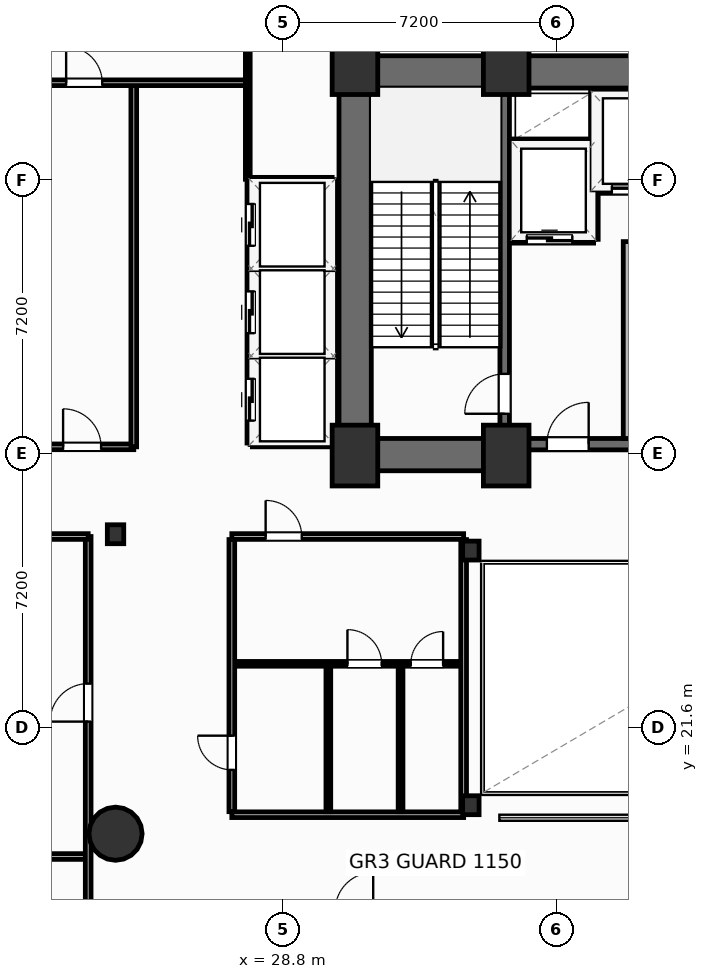
"""IFC4 building model, lengths in metres.
Left out: names, types, materials, properties, quantities, classifications, styles, units other than length and angle.
Written with IfcOpenShell. Run it as: python <this file> out.ifc"""

import sys

from ifc_helpers import new_model, si_unit, direction, frame, frame_2d, origin, origin_2d, place, context, subcontext, project, spatial, rectangle, circle, i_section, extrude, element, fill, save


model = new_model("IFC4")
c1 = context("Model", 3, precision=1e-05, world=origin(), true_north=direction((0.0, 1.0)))
c2 = subcontext(c1, "Body", "Model", "MODEL_VIEW")
j1 = project(units=[si_unit("LENGTHUNIT", "METRE"), si_unit("PLANEANGLEUNIT", "RADIAN")], contexts=[c1])
p1 = place(None, origin())
s1 = spatial("IfcSite", under=j1, at=p1, CompositionType="ELEMENT")
p2 = place(p1, origin())
s2 = spatial("IfcBuilding", under=s1, at=p2, CompositionType="ELEMENT")
p3 = place(p2, frame((0.0, 0.0, 21.6)))
s3 = spatial("IfcBuildingStorey", under=s2, at=p3, CompositionType="ELEMENT", Elevation=21.6)
for number, where, z_axis, x_axis in (
    (1, (30.7, 28.75, 0.0), (0.0, 0.0, 1.0), (1.0, 0.0, 0.0)),
    (2, (34.68, 28.75, 0.0), (0.0, 0.0, 1.0), (1.0, 0.0, 0.0)),
    (3, (30.7, 39.05, 0.0), (0.0, 0.0, 1.0), (1.0, 0.0, 0.0)),
    (4, (34.68, 39.05, 0.0), (0.0, 0.0, 1.0), (1.0, 0.0, 0.0)),
):
    element("IfcColumn", number, at=place(p3, frame(where, z_axis=z_axis, x_axis=x_axis)), inside=s3, PredefinedType="COLUMN", context=c2, shape_type="SweptSolid", body=[
        extrude(rectangle(XDim=1.2, YDim=1.6, at=origin_2d()), origin(), (0.0, 0.0, 1.0), 5.4),
    ])
for number, where, z_axis, x_axis in (
    (5, (33.75, 19.55, 0.0), (0.0, 0.0, 1.0), (1.0, 0.0, 0.0)),
    (6, (33.75, 26.25, 0.0), (0.0, 0.0, 1.0), (1.0, 0.0, 0.0)),
    (7, (24.4, 26.68, 0.0), (0.0, 0.0, 1.0), (1.0, 0.0, 0.0)),
):
    element("IfcColumn", number, at=place(p3, frame(where, z_axis=z_axis, x_axis=x_axis)), inside=s3, PredefinedType="COLUMN", context=c2, shape_type="SweptSolid", body=[
        extrude(i_section(OverallWidth=0.432, OverallDepth=0.498, WebThickness=0.056, FlangeThickness=0.089, FilletRadius=0.025, at=origin_2d()), origin(), (0.0, 0.0, 1.0), 5.4),
    ])
p4 = place(p3, frame((30.28, 38.845, 0.0), z_axis=(0.0, 0.0, 1.0), x_axis=(1.0, 0.0, 0.0)))
e8 = element("IfcWall", 8, at=p4, inside=s3, PredefinedType="SHEAR", context=c2, shape_type="SweptSolid", body=[
    extrude(rectangle(XDim=17.84, YDim=0.85, at=frame_2d((8.92, 0.0))), origin(), (0.0, 0.0, 1.0), 5.15),
])
p5 = place(p3, frame((30.705, 29.2, 0.0), z_axis=(0.0, 0.0, 1.0), x_axis=(0.0, 1.0, 0.0)))
e9 = element("IfcWall", 9, at=p5, inside=s3, PredefinedType="SHEAR", context=c2, shape_type="SweptSolid", body=[
    extrude(rectangle(XDim=9.22, YDim=0.85, at=frame_2d((4.61, 0.0))), origin(), (0.0, 0.0, 1.0), 5.15),
])
p6 = place(p3, frame((30.28, 28.775, 0.0), z_axis=(0.0, 0.0, 1.0), x_axis=(1.0, 0.0, 0.0)))
e10 = element("IfcWall", 10, at=p6, inside=s3, PredefinedType="SHEAR", context=c2, shape_type="SweptSolid", body=[
    extrude(rectangle(XDim=4.52, YDim=0.85, at=frame_2d((2.26, 0.0))), origin(), (0.0, 0.0, 1.0), 5.15),
])
p7 = place(p3, frame((34.8, 29.05, 0.0), z_axis=(0.0, 0.0, 1.0), x_axis=(1.0, 0.0, 0.0)))
e11 = element("IfcWall", 11, at=p7, inside=s3, PredefinedType="SHEAR", context=c2, shape_type="SweptSolid", body=[
    extrude(rectangle(XDim=8.8, YDim=0.3, at=frame_2d((4.4, 0.0))), origin(), (0.0, 0.0, 1.0), 5.15),
])
p8 = place(p7, frame((0.95, 0.0, 0.0)))
e12 = element("IfcOpeningElement", 12, at=p8, cuts=e11, PredefinedType="OPENING", context=c2, shape_type="SweptSolid", body=[
    extrude(rectangle(XDim=1.1, YDim=2.15, at=frame_2d((0.55, 1.075))), frame((0.0, 0.16, 0.0), z_axis=(0.0, -1.0, 0.0), x_axis=(1.0, 0.0, 0.0)), (0.0, 0.0, 1.0), 0.32),
])
p9 = place(p7, frame((6.75, 0.0, 0.0)))
e13 = element("IfcOpeningElement", 13, at=p9, cuts=e11, PredefinedType="OPENING", context=c2, shape_type="SweptSolid", body=[
    extrude(rectangle(XDim=1.1, YDim=2.15, at=frame_2d((0.55, 1.075))), frame((0.0, 0.16, 0.0), z_axis=(0.0, -1.0, 0.0), x_axis=(1.0, 0.0, 0.0)), (0.0, 0.0, 1.0), 0.32),
])
p10 = place(p7, frame((4.45, 0.0, 0.0)))
e14 = element("IfcOpeningElement", 14, at=p10, cuts=e11, PredefinedType="OPENING", context=c2, shape_type="SweptSolid", body=[
    extrude(rectangle(XDim=0.95, YDim=2.15, at=frame_2d((0.475, 1.075))), frame((0.0, 0.16, 0.0), z_axis=(0.0, -1.0, 0.0), x_axis=(1.0, 0.0, 0.0)), (0.0, 0.0, 1.0), 0.32),
])
p11 = place(p3, frame((34.64, 29.2, 0.0), z_axis=(0.0, 0.0, 1.0), x_axis=(0.0, 1.0, 0.0)))
e15 = element("IfcWall", 15, at=p11, inside=s3, PredefinedType="SHEAR", context=c2, shape_type="SweptSolid", body=[
    extrude(rectangle(XDim=9.22, YDim=0.25, at=frame_2d((4.61, 0.0))), origin(), (0.0, 0.0, 1.0), 5.15),
])
p12 = place(p11, frame((0.65, 0.0, 0.0)))
e16 = element("IfcOpeningElement", 16, at=p12, cuts=e15, PredefinedType="OPENING", context=c2, shape_type="SweptSolid", body=[
    extrude(rectangle(XDim=1.05, YDim=2.15, at=frame_2d((0.525, 1.075))), frame((0.0, 0.135, 0.0), z_axis=(0.0, -1.0, 0.0), x_axis=(1.0, 0.0, 0.0)), (0.0, 0.0, 1.0), 0.27),
])
p13 = place(p3, frame((24.4, 18.8, 0.0), z_axis=(0.0, 0.0, 1.0), x_axis=(1.0, 0.0, 0.0)))
e17 = element("IfcColumn", 17, at=p13, inside=s3, PredefinedType="COLUMN", context=c2, shape_type="SweptSolid", body=[
    extrude(circle(Radius=0.7, at=origin_2d()), origin(), (0.0, 0.0, 1.0), 5.4),
])
p14 = place(p3, frame((22.22, 28.98, 0.0), z_axis=(0.0, 0.0, 1.0), x_axis=(1.0, 0.0, 0.0)))
e18 = element("IfcWall", 18, at=p14, inside=s3, PredefinedType="PARTITIONING", context=c2, shape_type="SweptSolid", body=[
    extrude(rectangle(XDim=2.66, YDim=0.15, at=frame_2d((1.33, 0.0))), origin(), (0.0, 0.0, 1.0), 5.15),
])
p15 = place(p14, frame((0.8, 0.0, 0.0)))
e19 = element("IfcOpeningElement", 19, at=p15, cuts=e18, PredefinedType="OPENING", context=c2, shape_type="SweptSolid", body=[
    extrude(rectangle(XDim=1.0, YDim=2.05, at=frame_2d((0.5, 1.025))), frame((0.0, 0.085, 0.0), z_axis=(0.0, -1.0, 0.0), x_axis=(1.0, 0.0, 0.0)), (0.0, 0.0, 1.0), 0.17),
])
p16 = place(p3, frame((24.88, 28.98, 0.0), z_axis=(0.0, 0.0, 1.0), x_axis=(0.0, 1.0, 0.0)))
e20 = element("IfcWall", 20, at=p16, inside=s3, PredefinedType="PARTITIONING", context=c2, shape_type="SweptSolid", body=[
    extrude(rectangle(XDim=9.58, YDim=0.15, at=frame_2d((4.79, 0.0))), origin(), (0.0, 0.0, 1.0), 5.15),
])
p17 = place(p3, frame((18.6, 38.56, 0.0), z_axis=(0.0, 0.0, 1.0), x_axis=(1.0, 0.0, 0.0)))
e21 = element("IfcWall", 21, at=p17, inside=s3, PredefinedType="PARTITIONING", context=c2, shape_type="SweptSolid", body=[
    extrude(rectangle(XDim=9.28, YDim=0.15, at=frame_2d((4.64, 0.0))), origin(), (0.0, 0.0, 1.0), 5.15),
])
p18 = place(p17, frame((4.5, 0.0, 0.0)))
e22 = element("IfcOpeningElement", 22, at=p18, cuts=e21, PredefinedType="OPENING", context=c2, shape_type="SweptSolid", body=[
    extrude(rectangle(XDim=0.95, YDim=2.05, at=frame_2d((0.475, 1.025))), frame((0.0, 0.085, 0.0), z_axis=(0.0, -1.0, 0.0), x_axis=(1.0, 0.0, 0.0)), (0.0, 0.0, 1.0), 0.17),
])
p19 = place(p3, frame((27.88, 36.02, 0.0), z_axis=(0.0, 0.0, 1.0), x_axis=(0.0, 1.0, 0.0)))
e23 = element("IfcWall", 23, at=p19, inside=s3, PredefinedType="PARTITIONING", context=c2, shape_type="SweptSolid", body=[
    extrude(rectangle(XDim=14.18, YDim=0.125, at=frame_2d((7.09, 0.0))), origin(), (0.0, 0.0, 1.0), 5.15),
])
p20 = place(p3, frame((0.2, 18.2, 0.0), z_axis=(0.0, 0.0, 1.0), x_axis=(1.0, 0.0, 0.0)))
e24 = element("IfcWall", 24, at=p20, inside=s3, PredefinedType="PARTITIONING", context=c2, shape_type="SweptSolid", body=[
    extrude(rectangle(XDim=23.48, YDim=0.15, at=frame_2d((11.74, 0.0))), origin(), (0.0, 0.0, 1.0), 1.935),
])
p21 = place(p3, frame((23.68, 0.25, 0.0), z_axis=(0.0, 0.0, 1.0), x_axis=(0.0, 1.0, 0.0)))
e25 = element("IfcWall", 25, at=p21, inside=s3, PredefinedType="PARTITIONING", context=c2, shape_type="SweptSolid", body=[
    extrude(rectangle(XDim=26.37, YDim=0.15, at=frame_2d((13.185, 0.0))), origin(), (0.0, 0.0, 1.0), 5.15),
])
p22 = place(p21, frame((21.5, 0.0, 0.0)))
e26 = element("IfcOpeningElement", 26, at=p22, cuts=e25, PredefinedType="OPENING", context=c2, shape_type="SweptSolid", body=[
    extrude(rectangle(XDim=1.0, YDim=2.05, at=frame_2d((0.5, 1.025))), frame((0.0, 0.085, 0.0), z_axis=(0.0, -1.0, 0.0), x_axis=(1.0, 0.0, 0.0)), (0.0, 0.0, 1.0), 0.17),
])
p23 = place(p21, frame((13.2, 0.0, 0.0)))
e27 = element("IfcOpeningElement", 27, at=p23, cuts=e25, PredefinedType="OPENING", context=c2, shape_type="SweptSolid", body=[
    extrude(rectangle(XDim=1.0, YDim=2.05, at=frame_2d((0.5, 1.025))), frame((0.0, 0.085, 0.0), z_axis=(0.0, -1.0, 0.0), x_axis=(1.0, 0.0, 0.0)), (0.0, 0.0, 1.0), 0.17),
])
p24 = place(p3, frame((0.2, 26.62, 0.0), z_axis=(0.0, 0.0, 1.0), x_axis=(1.0, 0.0, 0.0)))
e28 = element("IfcWall", 28, at=p24, inside=s3, PredefinedType="PARTITIONING", context=c2, shape_type="SweptSolid", body=[
    extrude(rectangle(XDim=23.48, YDim=0.15, at=frame_2d((11.74, 0.0))), origin(), (0.0, 0.0, 1.0), 5.15),
])
p25 = place(p3, frame((37.86, 29.2, 0.0), z_axis=(0.0, 0.0, 1.0), x_axis=(0.0, 1.0, 0.0)))
e29 = element("IfcWall", 29, at=p25, inside=s3, PredefinedType="PARTITIONING", context=c2, shape_type="SweptSolid", body=[
    extrude(rectangle(XDim=5.18, YDim=0.2, at=frame_2d((2.59, 0.0))), origin(), (0.0, 0.0, 1.0), 5.15),
])
p26 = place(p3, frame((34.8, 34.44, 0.0), z_axis=(0.0, 0.0, 1.0), x_axis=(1.0, 0.0, 0.0)))
e30 = element("IfcWall", 30, at=p26, inside=s3, PredefinedType="PARTITIONING", context=c2, shape_type="SweptSolid", body=[
    extrude(rectangle(XDim=2.18, YDim=0.2, at=frame_2d((1.09, 0.0))), origin(), (0.0, 0.0, 1.0), 5.15),
])
p27 = place(p26, frame((0.42, 0.0, 0.0)))
e31 = element("IfcOpeningElement", 31, at=p27, cuts=e30, PredefinedType="OPENING", context=c2, shape_type="SweptSolid", body=[
    extrude(rectangle(XDim=1.2, YDim=2.2, at=frame_2d((0.6, 1.1))), frame((0.0, 0.11, 0.0), z_axis=(0.0, -1.0, 0.0), x_axis=(1.0, 0.0, 0.0)), (0.0, 0.0, 1.0), 0.22),
])
p28 = place(p3, frame((34.8, 36.98, 0.0), z_axis=(0.0, 0.0, 1.0), x_axis=(1.0, 0.0, 0.0)))
e32 = element("IfcWall", 32, at=p28, inside=s3, PredefinedType="PARTITIONING", context=c2, shape_type="SweptSolid", body=[
    extrude(rectangle(XDim=2.18, YDim=0.2, at=frame_2d((1.09, 0.0))), origin(), (0.0, 0.0, 1.0), 5.15),
])
p29 = place(p3, frame((37.0, 34.44, 0.0), z_axis=(0.0, 0.0, 1.0), x_axis=(0.0, 1.0, 0.0)))
e33 = element("IfcWall", 33, at=p29, inside=s3, PredefinedType="PARTITIONING", context=c2, shape_type="SweptSolid", body=[
    extrude(rectangle(XDim=3.9, YDim=0.2, at=frame_2d((1.95, 0.0))), origin(), (0.0, 0.0, 1.0), 5.15),
])
p30 = place(p3, frame((37.06, 35.75, 0.0), z_axis=(0.0, 0.0, 1.0), x_axis=(1.0, 0.0, 0.0)))
e34 = element("IfcWall", 34, at=p30, inside=s3, PredefinedType="PARTITIONING", context=c2, shape_type="SweptSolid", body=[
    extrude(rectangle(XDim=2.12, YDim=0.2, at=frame_2d((1.06, 0.0))), origin(), (0.0, 0.0, 1.0), 5.15),
])
p31 = place(p30, frame((0.4, 0.0, 0.0)))
e35 = element("IfcOpeningElement", 35, at=p31, cuts=e34, PredefinedType="OPENING", context=c2, shape_type="SweptSolid", body=[
    extrude(rectangle(XDim=1.3, YDim=2.2, at=frame_2d((0.65, 1.1))), frame((0.0, 0.11, 0.0), z_axis=(0.0, -1.0, 0.0), x_axis=(1.0, 0.0, 0.0)), (0.0, 0.0, 1.0), 0.22),
])
p32 = place(p3, frame((27.46, 26.62, 0.0), z_axis=(0.0, 0.0, 1.0), x_axis=(1.0, 0.0, 0.0)))
e36 = element("IfcWall", 36, at=p32, inside=s3, PredefinedType="PARTITIONING", context=c2, shape_type="SweptSolid", body=[
    extrude(rectangle(XDim=6.1, YDim=0.15, at=frame_2d((3.05, 0.0))), origin(), (0.0, 0.0, 1.0), 4.362),
])
p33 = place(p32, frame((0.89, 0.0, 0.0)))
e37 = element("IfcOpeningElement", 37, at=p33, cuts=e36, PredefinedType="OPENING", context=c2, shape_type="SweptSolid", body=[
    extrude(rectangle(XDim=0.95, YDim=2.05, at=frame_2d((0.475, 1.025))), frame((0.0, 0.085, 0.0), z_axis=(0.0, -1.0, 0.0), x_axis=(1.0, 0.0, 0.0)), (0.0, 0.0, 1.0), 0.17),
])
p34 = place(p3, frame((27.46, 19.3, 0.0), z_axis=(0.0, 0.0, 1.0), x_axis=(1.0, 0.0, 0.0)))
e38 = element("IfcWall", 38, at=p34, inside=s3, PredefinedType="PARTITIONING", context=c2, shape_type="SweptSolid", body=[
    extrude(rectangle(XDim=6.1, YDim=0.15, at=frame_2d((3.05, 0.0))), origin(), (0.0, 0.0, 1.0), 4.362),
])
p35 = place(p3, frame((27.52, 23.27, 0.0), z_axis=(0.0, 0.0, 1.0), x_axis=(1.0, 0.0, 0.0)))
e39 = element("IfcWall", 39, at=p35, inside=s3, PredefinedType="PARTITIONING", context=c2, shape_type="SweptSolid", body=[
    extrude(rectangle(XDim=6.0, YDim=0.125, at=frame_2d((3.0, 0.0))), origin(), (0.0, 0.0, 1.0), 5.15),
])
p36 = place(p35, frame((2.982, 0.0, 0.0)))
e40 = element("IfcOpeningElement", 40, at=p36, cuts=e39, PredefinedType="OPENING", context=c2, shape_type="SweptSolid", body=[
    extrude(rectangle(XDim=0.9, YDim=2.05, at=frame_2d((0.45, 1.025))), frame((0.0, 0.073, 0.0), z_axis=(0.0, -1.0, 0.0), x_axis=(1.0, 0.0, 0.0)), (0.0, 0.0, 1.0), 0.145),
])
p37 = place(p35, frame((4.65, 0.0, 0.0)))
e41 = element("IfcOpeningElement", 41, at=p37, cuts=e39, PredefinedType="OPENING", context=c2, shape_type="SweptSolid", body=[
    extrude(rectangle(XDim=0.85, YDim=2.05, at=frame_2d((0.425, 1.025))), frame((0.0, 0.073, 0.0), z_axis=(0.0, -1.0, 0.0), x_axis=(1.0, 0.0, 0.0)), (0.0, 0.0, 1.0), 0.145),
])
for number, where, z_axis, x_axis in (
    (42, (30.0, 19.38, 0.0), (0.0, 0.0, 1.0), (0.0, 1.0, 0.0)),
    (43, (31.9, 19.38, 0.0), (0.0, 0.0, 1.0), (0.0, 1.0, 0.0)),
):
    element("IfcWall", number, at=place(p3, frame(where, z_axis=z_axis, x_axis=x_axis)), inside=s3, PredefinedType="PARTITIONING", context=c2, shape_type="SweptSolid", body=[
        extrude(rectangle(XDim=3.82, YDim=0.125, at=frame_2d((1.91, 0.0))), origin(), (0.0, 0.0, 1.0), 5.15),
    ])
p38 = place(p3, frame((27.46, 19.38, 0.0), z_axis=(0.0, 0.0, 1.0), x_axis=(0.0, 1.0, 0.0)))
e44 = element("IfcWall", 44, at=p38, inside=s3, PredefinedType="PARTITIONING", context=c2, shape_type="SweptSolid", body=[
    extrude(rectangle(XDim=7.16, YDim=0.15, at=frame_2d((3.58, 0.0))), origin(), (0.0, 0.0, 1.0), 5.15),
])
p39 = place(p38, frame((1.1, 0.0, 0.0)))
e45 = element("IfcOpeningElement", 45, at=p39, cuts=e44, PredefinedType="OPENING", context=c2, shape_type="SweptSolid", body=[
    extrude(rectangle(XDim=0.9, YDim=2.05, at=frame_2d((0.45, 1.025))), frame((0.0, 0.085, 0.0), z_axis=(0.0, -1.0, 0.0), x_axis=(1.0, 0.0, 0.0)), (0.0, 0.0, 1.0), 0.17),
])
p40 = place(p3, frame((33.56, 19.38, 0.0), z_axis=(0.0, 0.0, 1.0), x_axis=(0.0, 1.0, 0.0)))
e46 = element("IfcWall", 46, at=p40, inside=s3, PredefinedType="PARTITIONING", context=c2, shape_type="SweptSolid", body=[
    extrude(rectangle(XDim=7.16, YDim=0.15, at=frame_2d((3.58, 0.0))), origin(), (0.0, 0.0, 1.0), 4.524),
])
for number, where, z_axis, x_axis in (
    (47, (28.02, 31.375, 0.0), (0.0, 0.0, 1.0), (1.0, 0.0, 0.0)),
    (48, (28.02, 33.675, 0.0), (0.0, 0.0, 1.0), (1.0, 0.0, 0.0)),
):
    element("IfcWall", number, at=place(p3, frame(where, z_axis=z_axis, x_axis=x_axis)), inside=s3, PredefinedType="PARTITIONING", context=c2, shape_type="SweptSolid", body=[
        extrude(rectangle(XDim=2.06, YDim=0.2, at=frame_2d((1.03, 0.0))), origin(), (0.0, 0.0, 1.0), 5.15),
    ])
for number, where, z_axis, x_axis in (
    (49, (28.0, 29.08, 0.0), (0.0, 0.0, 1.0), (1.0, 0.0, 0.0)),
    (50, (28.0, 35.97, 0.0), (0.0, 0.0, 1.0), (1.0, 0.0, 0.0)),
):
    element("IfcWall", number, at=place(p3, frame(where, z_axis=z_axis, x_axis=x_axis)), inside=s3, PredefinedType="PARTITIONING", context=c2, shape_type="SweptSolid", body=[
        extrude(rectangle(XDim=2.1, YDim=0.2, at=frame_2d((1.05, 0.0))), origin(), (0.0, 0.0, 1.0), 5.15),
    ])
p41 = place(p3, frame((30.12, 29.08, 0.0), z_axis=(0.0, 0.0, 1.0), x_axis=(0.0, 1.0, 0.0)))
e51 = element("IfcWall", 51, at=p41, inside=s3, PredefinedType="PARTITIONING", context=c2, shape_type="SweptSolid", body=[
    extrude(rectangle(XDim=6.89, YDim=0.2, at=frame_2d((3.445, 0.0))), origin(), (0.0, 0.0, 1.0), 5.15),
])
p42 = place(p3, frame((27.96, 29.08, 0.0), z_axis=(0.0, 0.0, 1.0), x_axis=(0.0, 1.0, 0.0)))
e52 = element("IfcWall", 52, at=p42, inside=s3, PredefinedType="PARTITIONING", context=c2, shape_type="SweptSolid", body=[
    extrude(rectangle(XDim=6.89, YDim=0.2, at=frame_2d((3.445, 0.0))), origin(), (0.0, 0.0, 1.0), 5.15),
])
p43 = place(p42, frame((0.59, 0.0, 0.0)))
e53 = element("IfcOpeningElement", 53, at=p43, cuts=e52, PredefinedType="OPENING", context=c2, shape_type="SweptSolid", body=[
    extrude(rectangle(XDim=1.1, YDim=2.15, at=frame_2d((0.55, 1.075))), frame((0.0, 0.11, 0.0), z_axis=(0.0, -1.0, 0.0), x_axis=(1.0, 0.0, 0.0)), (0.0, 0.0, 1.0), 0.22),
])
p44 = place(p42, frame((2.89, 0.0, 0.0)))
e54 = element("IfcOpeningElement", 54, at=p44, cuts=e52, PredefinedType="OPENING", context=c2, shape_type="SweptSolid", body=[
    extrude(rectangle(XDim=1.1, YDim=2.15, at=frame_2d((0.55, 1.075))), frame((0.0, 0.11, 0.0), z_axis=(0.0, -1.0, 0.0), x_axis=(1.0, 0.0, 0.0)), (0.0, 0.0, 1.0), 0.22),
])
p45 = place(p42, frame((5.19, 0.0, 0.0)))
e55 = element("IfcOpeningElement", 55, at=p45, cuts=e52, PredefinedType="OPENING", context=c2, shape_type="SweptSolid", body=[
    extrude(rectangle(XDim=1.1, YDim=2.15, at=frame_2d((0.55, 1.075))), frame((0.0, 0.11, 0.0), z_axis=(0.0, -1.0, 0.0), x_axis=(1.0, 0.0, 0.0)), (0.0, 0.0, 1.0), 0.22),
])
p46 = place(p15, origin())
e56 = element("IfcDoor", 56, at=p46, inside=s3, OperationType="SINGLE_SWING_LEFT", PredefinedType="DOOR", context=c2, shape_type="SweptSolid", body=[
    extrude(rectangle(XDim=1.0, YDim=2.05, at=frame_2d((0.5, 1.025))), frame((0.0, 0.025, 0.0), z_axis=(0.0, -1.0, 0.0), x_axis=(1.0, 0.0, 0.0)), (0.0, 0.0, 1.0), 0.05),
])
fill(e19, e56)
p47 = place(p18, origin())
e57 = element("IfcDoor", 57, at=p47, inside=s3, OperationType="SINGLE_SWING_LEFT", PredefinedType="DOOR", context=c2, shape_type="SweptSolid", body=[
    extrude(rectangle(XDim=0.95, YDim=2.05, at=frame_2d((0.475, 1.025))), frame((0.0, 0.025, 0.0), z_axis=(0.0, -1.0, 0.0), x_axis=(1.0, 0.0, 0.0)), (0.0, 0.0, 1.0), 0.05),
])
fill(e22, e57)
p48 = place(p22, origin())
e58 = element("IfcDoor", 58, at=p48, inside=s3, OperationType="SINGLE_SWING_LEFT", PredefinedType="DOOR", context=c2, shape_type="SweptSolid", body=[
    extrude(rectangle(XDim=1.0, YDim=2.05, at=frame_2d((0.5, 1.025))), frame((0.0, 0.025, 0.0), z_axis=(0.0, -1.0, 0.0), x_axis=(1.0, 0.0, 0.0)), (0.0, 0.0, 1.0), 0.05),
])
fill(e26, e58)
p49 = place(p12, origin())
e59 = element("IfcDoor", 59, at=p49, inside=s3, OperationType="SINGLE_SWING_LEFT", PredefinedType="DOOR", context=c2, shape_type="SweptSolid", body=[
    extrude(rectangle(XDim=1.05, YDim=2.15, at=frame_2d((0.525, 1.075))), frame((0.0, 0.025, 0.0), z_axis=(0.0, -1.0, 0.0), x_axis=(1.0, 0.0, 0.0)), (0.0, 0.0, 1.0), 0.05),
])
fill(e16, e59)
p50 = place(p8, origin())
e60 = element("IfcDoor", 60, at=p50, inside=s3, OperationType="SINGLE_SWING_RIGHT", PredefinedType="DOOR", context=c2, shape_type="SweptSolid", body=[
    extrude(rectangle(XDim=1.1, YDim=2.15, at=frame_2d((0.55, 1.075))), frame((0.0, 0.025, 0.0), z_axis=(0.0, -1.0, 0.0), x_axis=(1.0, 0.0, 0.0)), (0.0, 0.0, 1.0), 0.05),
])
fill(e12, e60)
p51 = place(p27, origin())
e61 = element("IfcDoor", 61, at=p51, inside=s3, OperationType="SLIDING_TO_LEFT", PredefinedType="DOOR", context=c2, shape_type="SweptSolid", body=[
    extrude(rectangle(XDim=1.2, YDim=2.2, at=frame_2d((0.6, 1.1))), frame((0.0, 0.025, 0.0), z_axis=(0.0, -1.0, 0.0), x_axis=(1.0, 0.0, 0.0)), (0.0, 0.0, 1.0), 0.05),
])
fill(e31, e61)
p52 = place(p31, origin())
e62 = element("IfcDoor", 62, at=p52, inside=s3, OperationType="SLIDING_TO_LEFT", PredefinedType="DOOR", context=c2, shape_type="SweptSolid", body=[
    extrude(rectangle(XDim=1.3, YDim=2.2, at=frame_2d((0.65, 1.1))), frame((0.0, 0.025, 0.0), z_axis=(0.0, -1.0, 0.0), x_axis=(1.0, 0.0, 0.0)), (0.0, 0.0, 1.0), 0.05),
])
fill(e35, e62)
p53 = place(p33, origin())
e63 = element("IfcDoor", 63, at=p53, inside=s3, OperationType="SINGLE_SWING_LEFT", PredefinedType="DOOR", context=c2, shape_type="SweptSolid", body=[
    extrude(rectangle(XDim=0.95, YDim=2.05, at=frame_2d((0.475, 1.025))), frame((0.0, 0.025, 0.0), z_axis=(0.0, -1.0, 0.0), x_axis=(1.0, 0.0, 0.0)), (0.0, 0.0, 1.0), 0.05),
])
fill(e37, e63)
p54 = place(p36, origin())
e64 = element("IfcDoor", 64, at=p54, inside=s3, OperationType="SINGLE_SWING_LEFT", PredefinedType="DOOR", context=c2, shape_type="SweptSolid", body=[
    extrude(rectangle(XDim=0.9, YDim=2.05, at=frame_2d((0.45, 1.025))), frame((0.0, 0.025, 0.0), z_axis=(0.0, -1.0, 0.0), x_axis=(1.0, 0.0, 0.0)), (0.0, 0.0, 1.0), 0.05),
])
fill(e40, e64)
p55 = place(p37, origin())
e65 = element("IfcDoor", 65, at=p55, inside=s3, OperationType="SINGLE_SWING_RIGHT", PredefinedType="DOOR", context=c2, shape_type="SweptSolid", body=[
    extrude(rectangle(XDim=0.85, YDim=2.05, at=frame_2d((0.425, 1.025))), frame((0.0, 0.025, 0.0), z_axis=(0.0, -1.0, 0.0), x_axis=(1.0, 0.0, 0.0)), (0.0, 0.0, 1.0), 0.05),
])
fill(e41, e65)
p56 = place(p39, origin())
e66 = element("IfcDoor", 66, at=p56, inside=s3, OperationType="SINGLE_SWING_RIGHT", PredefinedType="DOOR", context=c2, shape_type="SweptSolid", body=[
    extrude(rectangle(XDim=0.9, YDim=2.05, at=frame_2d((0.45, 1.025))), frame((0.0, 0.025, 0.0), z_axis=(0.0, -1.0, 0.0), x_axis=(1.0, 0.0, 0.0)), (0.0, 0.0, 1.0), 0.05),
])
fill(e45, e66)
p57 = place(p43, origin())
e67 = element("IfcDoor", 67, at=p57, inside=s3, OperationType="SLIDING_TO_LEFT", PredefinedType="DOOR", context=c2, shape_type="SweptSolid", body=[
    extrude(rectangle(XDim=1.1, YDim=2.15, at=frame_2d((0.55, 1.075))), frame((0.0, 0.025, 0.0), z_axis=(0.0, -1.0, 0.0), x_axis=(1.0, 0.0, 0.0)), (0.0, 0.0, 1.0), 0.05),
])
fill(e53, e67)
p58 = place(p44, origin())
e68 = element("IfcDoor", 68, at=p58, inside=s3, OperationType="SLIDING_TO_LEFT", PredefinedType="DOOR", context=c2, shape_type="SweptSolid", body=[
    extrude(rectangle(XDim=1.1, YDim=2.15, at=frame_2d((0.55, 1.075))), frame((0.0, 0.025, 0.0), z_axis=(0.0, -1.0, 0.0), x_axis=(1.0, 0.0, 0.0)), (0.0, 0.0, 1.0), 0.05),
])
fill(e54, e68)
p59 = place(p45, origin())
e69 = element("IfcDoor", 69, at=p59, inside=s3, OperationType="SLIDING_TO_LEFT", PredefinedType="DOOR", context=c2, shape_type="SweptSolid", body=[
    extrude(rectangle(XDim=1.1, YDim=2.15, at=frame_2d((0.55, 1.075))), frame((0.0, 0.025, 0.0), z_axis=(0.0, -1.0, 0.0), x_axis=(1.0, 0.0, 0.0)), (0.0, 0.0, 1.0), 0.05),
])
fill(e55, e69)
save(model, sys.argv[1])
